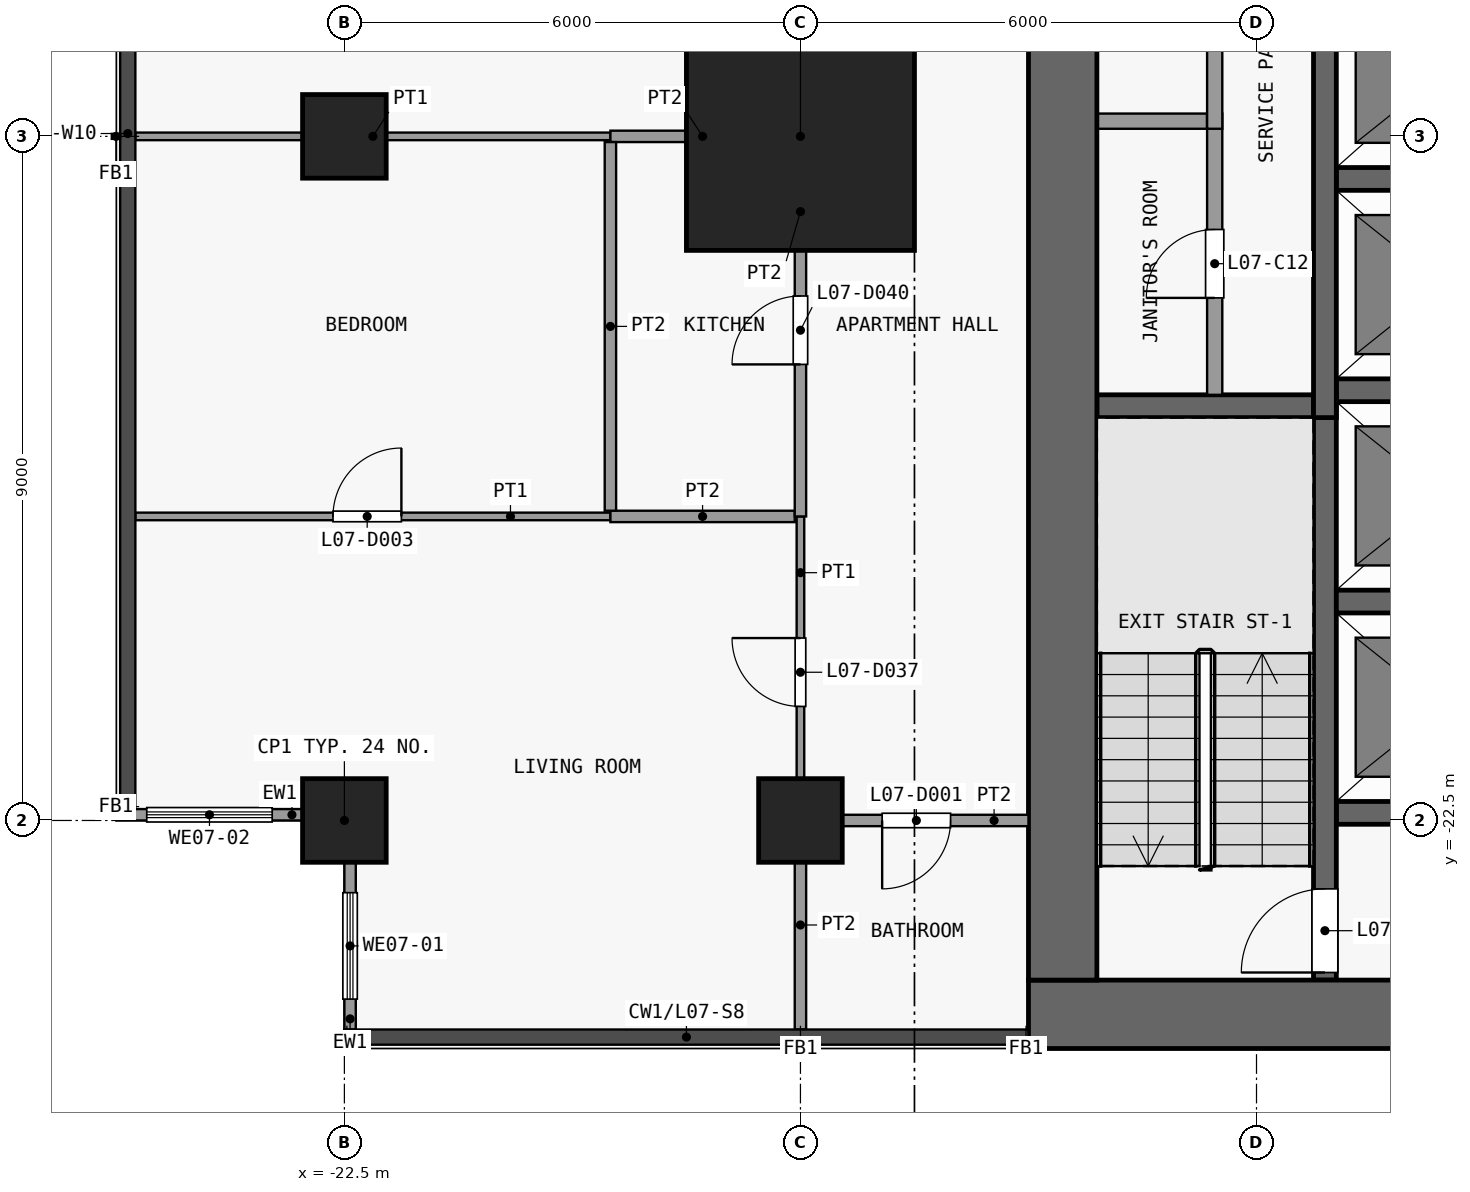
"""IFC4 building model, lengths in metres.
Left out: names, types, materials, properties, quantities, classifications, styles, units other than length and angle.
Written with IfcOpenShell. Run it as: python <this file> out.ifc"""

import sys

from ifc_helpers import new_model, si_unit, direction, frame, frame_2d, origin, origin_2d, place, context, subcontext, project, spatial, rectangle, extrude, element, fill, save


model = new_model("IFC4")
c1 = context("Model", 3, precision=1e-05, world=origin(), true_north=direction((0.0, 1.0)))
c2 = subcontext(c1, "Body", "Model", "MODEL_VIEW")
j1 = project(units=[si_unit("LENGTHUNIT", "METRE"), si_unit("PLANEANGLEUNIT", "RADIAN")], contexts=[c1])
p1 = place(None, origin())
s1 = spatial("IfcSite", under=j1, at=p1, CompositionType="ELEMENT")
p2 = place(p1, origin())
s2 = spatial("IfcBuilding", under=s1, at=p2, CompositionType="ELEMENT")
p3 = place(p2, frame((0.0, 0.0, 36.1)))
s3 = spatial("IfcBuildingStorey", under=s2, at=p3, CompositionType="ELEMENT", Elevation=36.1)
for number, where, z_axis, x_axis in (
    (1, (-22.5, -22.5, 0.0), (0.0, 0.0, 1.0), (1.0, 0.0, 0.0)),
    (2, (-22.5, -13.5, 0.0), (0.0, 0.0, 1.0), (1.0, 0.0, 0.0)),
    (3, (-16.5, -22.5, 0.0), (0.0, 0.0, 1.0), (1.0, 0.0, 0.0)),
):
    element("IfcColumn", number, at=place(p3, frame(where, z_axis=z_axis, x_axis=x_axis)), inside=s3, PredefinedType="COLUMN", context=c2, shape_type="SweptSolid", body=[
        extrude(rectangle(XDim=1.1, YDim=1.1, at=origin_2d()), origin(), (0.0, 0.0, 1.0), 3.6),
    ])
p4 = place(p3, frame((-16.5, -13.5, 0.0), z_axis=(0.0, 0.0, 1.0), x_axis=(1.0, 0.0, 0.0)))
e4 = element("IfcColumn", 4, at=p4, inside=s3, PredefinedType="COLUMN", context=c2, shape_type="SweptSolid", body=[
    extrude(rectangle(XDim=3.0, YDim=3.0, at=origin_2d()), origin(), (0.0, 0.0, 1.0), 3.6),
])
p5 = place(p3, frame((-13.5, -25.05, 0.0), z_axis=(0.0, 0.0, 1.0), x_axis=(1.0, 0.0, 0.0)))
e5 = element("IfcWall", 5, at=p5, inside=s3, PredefinedType="SHEAR", context=c2, shape_type="SweptSolid", body=[
    extrude(rectangle(XDim=27.0, YDim=0.9, at=frame_2d((13.5, 0.0))), origin(), (0.0, 0.0, 1.0), 3.3),
])
p6 = place(p3, frame((-13.05, -24.6, 0.0), z_axis=(0.0, 0.0, 1.0), x_axis=(0.0, 1.0, 0.0)))
e6 = element("IfcWall", 6, at=p6, inside=s3, PredefinedType="SHEAR", context=c2, shape_type="SweptSolid", body=[
    extrude(rectangle(XDim=16.1, YDim=0.9, at=frame_2d((8.05, 0.0))), origin(), (0.0, 0.0, 1.0), 3.3),
])
for number, where, z_axis, x_axis in (
    (7, (-9.45, -22.4, 0.0), (0.0, 0.0, 1.0), (1.0, 0.0, 0.0)),
    (8, (-9.45, -19.62, 0.0), (0.0, 0.0, 1.0), (1.0, 0.0, 0.0)),
):
    element("IfcWall", number, at=place(p3, frame(where, z_axis=z_axis, x_axis=x_axis)), inside=s3, PredefinedType="SHEAR", context=c2, shape_type="SweptSolid", body=[
        extrude(rectangle(XDim=2.8, YDim=0.3, at=frame_2d((1.4, 0.0))), origin(), (0.0, 0.0, 1.0), 3.3),
    ])
p7 = place(p3, frame((-12.6, -17.05, 0.0), z_axis=(0.0, 0.0, 1.0), x_axis=(1.0, 0.0, 0.0)))
e9 = element("IfcWall", 9, at=p7, inside=s3, PredefinedType="SHEAR", context=c2, shape_type="SweptSolid", body=[
    extrude(rectangle(XDim=2.85, YDim=0.3, at=frame_2d((1.425, 0.0))), origin(), (0.0, 0.0, 1.0), 3.3),
])
for number, where, z_axis, x_axis in (
    (10, (-9.45, -16.84, 0.0), (0.0, 0.0, 1.0), (1.0, 0.0, 0.0)),
    (11, (-9.45, -14.06, 0.0), (0.0, 0.0, 1.0), (1.0, 0.0, 0.0)),
):
    element("IfcWall", number, at=place(p3, frame(where, z_axis=z_axis, x_axis=x_axis)), inside=s3, PredefinedType="SHEAR", context=c2, shape_type="SweptSolid", body=[
        extrude(rectangle(XDim=2.8, YDim=0.3, at=frame_2d((1.4, 0.0))), origin(), (0.0, 0.0, 1.0), 3.3),
    ])
p8 = place(p3, frame((-12.6, -13.3, 0.0), z_axis=(0.0, 0.0, 1.0), x_axis=(1.0, 0.0, 0.0)))
e12 = element("IfcWall", 12, at=p8, inside=s3, PredefinedType="PARTITIONING", context=c2, shape_type="SweptSolid", body=[
    extrude(rectangle(XDim=1.45, YDim=0.2, at=frame_2d((0.725, 0.0))), origin(), (0.0, 0.0, 1.0), 3.3),
])
p9 = place(p3, frame((-11.05, -16.9, 0.0), z_axis=(0.0, 0.0, 1.0), x_axis=(0.0, 1.0, 0.0)))
e13 = element("IfcWall", 13, at=p9, inside=s3, PredefinedType="PARTITIONING", context=c2, shape_type="SweptSolid", body=[
    extrude(rectangle(XDim=3.7, YDim=0.2, at=frame_2d((1.85, 0.0))), origin(), (0.0, 0.0, 1.0), 3.3),
])
p10 = place(p9, frame((1.275, 0.0, 0.0)))
e14 = element("IfcOpeningElement", 14, at=p10, cuts=e13, PredefinedType="OPENING", context=c2, shape_type="SweptSolid", body=[
    extrude(rectangle(XDim=0.9, YDim=2.1, at=frame_2d((0.45, 1.05))), frame((0.0, 0.11, 0.0), z_axis=(0.0, -1.0, 0.0), x_axis=(1.0, 0.0, 0.0)), (0.0, 0.0, 1.0), 0.22),
])
p11 = place(p3, frame((-11.05, -13.4, 0.0), z_axis=(0.0, 0.0, 1.0), x_axis=(0.0, 1.0, 0.0)))
e15 = element("IfcWall", 15, at=p11, inside=s3, PredefinedType="PARTITIONING", context=c2, shape_type="SweptSolid", body=[
    extrude(rectangle(XDim=4.9, YDim=0.2, at=frame_2d((2.45, 0.0))), origin(), (0.0, 0.0, 1.0), 3.3),
])
p12 = place(p11, frame((2.05, 0.0, 0.0)))
e16 = element("IfcOpeningElement", 16, at=p12, cuts=e15, PredefinedType="OPENING", context=c2, shape_type="SweptSolid", body=[
    extrude(rectangle(XDim=0.9, YDim=2.1, at=frame_2d((0.45, 1.05))), frame((0.0, 0.11, 0.0), z_axis=(0.0, -1.0, 0.0), x_axis=(1.0, 0.0, 0.0)), (0.0, 0.0, 1.0), 0.22),
])
p13 = place(p3, frame((-9.6, -24.6, 0.0), z_axis=(0.0, 0.0, 1.0), x_axis=(0.0, 1.0, 0.0)))
e17 = element("IfcWall", 17, at=p13, inside=s3, PredefinedType="SHEAR", context=c2, shape_type="SweptSolid", body=[
    extrude(rectangle(XDim=7.7, YDim=0.3, at=frame_2d((3.85, 0.0))), origin(), (0.0, 0.0, 1.0), 3.3),
])
p14 = place(p13, frame((0.1, 0.0, 0.0)))
e18 = element("IfcOpeningElement", 18, at=p14, cuts=e17, PredefinedType="OPENING", context=c2, shape_type="SweptSolid", body=[
    extrude(rectangle(XDim=1.1, YDim=2.1, at=frame_2d((0.55, 1.05))), frame((0.0, 0.16, 0.0), z_axis=(0.0, -1.0, 0.0), x_axis=(1.0, 0.0, 0.0)), (0.0, 0.0, 1.0), 0.32),
])
p15 = place(p3, frame((-9.6, -17.2, 0.0), z_axis=(0.0, 0.0, 1.0), x_axis=(0.0, 1.0, 0.0)))
e19 = element("IfcWall", 19, at=p15, inside=s3, PredefinedType="SHEAR", context=c2, shape_type="SweptSolid", body=[
    extrude(rectangle(XDim=8.7, YDim=0.3, at=frame_2d((4.35, 0.0))), origin(), (0.0, 0.0, 1.0), 3.3),
])
p16 = place(p3, frame((-22.425, -25.25, 0.0), z_axis=(0.0, 0.0, 1.0), x_axis=(0.0, 1.0, 0.0)))
e20 = element("IfcWall", 20, at=p16, inside=s3, PredefinedType="SOLIDWALL", context=c2, shape_type="SweptSolid", body=[
    extrude(rectangle(XDim=2.2, YDim=0.15, at=frame_2d((1.1, 0.0))), origin(), (0.0, 0.0, 1.0), 3.3),
])
p17 = place(p16, frame((0.4, 0.0, 0.9)))
e21 = element("IfcOpeningElement", 21, at=p17, cuts=e20, PredefinedType="OPENING", context=c2, shape_type="SweptSolid", body=[
    extrude(rectangle(XDim=1.4, YDim=2.4, at=frame_2d((0.7, 1.2))), frame((0.0, 0.085, 0.0), z_axis=(0.0, -1.0, 0.0), x_axis=(1.0, 0.0, 0.0)), (0.0, 0.0, 1.0), 0.17),
])
p18 = place(p3, frame((-23.05, -22.425, 0.0), z_axis=(0.0, 0.0, 1.0), x_axis=(-1.0, 0.0, 0.0)))
e22 = element("IfcWall", 22, at=p18, inside=s3, PredefinedType="SOLIDWALL", context=c2, shape_type="SweptSolid", body=[
    extrude(rectangle(XDim=2.45, YDim=0.15, at=frame_2d((1.225, 0.0))), origin(), (0.0, 0.0, 1.0), 3.3),
])
p19 = place(p18, frame((0.4, 0.0, 0.9)))
e23 = element("IfcOpeningElement", 23, at=p19, cuts=e22, PredefinedType="OPENING", context=c2, shape_type="SweptSolid", body=[
    extrude(rectangle(XDim=1.65, YDim=2.4, at=frame_2d((0.825, 1.2))), frame((0.0, 0.085, 0.0), z_axis=(0.0, -1.0, 0.0), x_axis=(1.0, 0.0, 0.0)), (0.0, 0.0, 1.0), 0.17),
])
p20 = place(p3, frame((-16.425, -22.5, 0.0), z_axis=(0.0, 0.0, 1.0), x_axis=(1.0, 0.0, 0.0)))
e24 = element("IfcWall", 24, at=p20, inside=s3, PredefinedType="PARTITIONING", context=c2, shape_type="SweptSolid", body=[
    extrude(rectangle(XDim=2.925, YDim=0.15, at=frame_2d((1.462, 0.0))), origin(), (0.0, 0.0, 1.0), 3.3),
])
p21 = place(p20, frame((1.0, 0.0, 0.0)))
e25 = element("IfcOpeningElement", 25, at=p21, cuts=e24, PredefinedType="OPENING", context=c2, shape_type="SweptSolid", body=[
    extrude(rectangle(XDim=0.9, YDim=2.1, at=frame_2d((0.45, 1.05))), frame((0.0, 0.085, 0.0), z_axis=(0.0, -1.0, 0.0), x_axis=(1.0, 0.0, 0.0)), (0.0, 0.0, 1.0), 0.17),
])
p22 = place(p3, frame((-25.25, -18.5, 0.0), z_axis=(0.0, 0.0, 1.0), x_axis=(1.0, 0.0, 0.0)))
e26 = element("IfcWall", 26, at=p22, inside=s3, PredefinedType="PARTITIONING", context=c2, shape_type="SweptSolid", body=[
    extrude(rectangle(XDim=6.25, YDim=0.1, at=frame_2d((3.125, 0.0))), origin(), (0.0, 0.0, 1.0), 3.3),
])
p23 = place(p22, frame((2.6, 0.0, 0.0)))
e27 = element("IfcOpeningElement", 27, at=p23, cuts=e26, PredefinedType="OPENING", context=c2, shape_type="SweptSolid", body=[
    extrude(rectangle(XDim=0.9, YDim=2.1, at=frame_2d((0.45, 1.05))), frame((0.0, 0.06, 0.0), z_axis=(0.0, -1.0, 0.0), x_axis=(1.0, 0.0, 0.0)), (0.0, 0.0, 1.0), 0.12),
])
p24 = place(p3, frame((-19.0, -18.5, 0.0), z_axis=(0.0, 0.0, 1.0), x_axis=(1.0, 0.0, 0.0)))
e28 = element("IfcWall", 28, at=p24, inside=s3, PredefinedType="PARTITIONING", context=c2, shape_type="SweptSolid", body=[
    extrude(rectangle(XDim=2.425, YDim=0.15, at=frame_2d((1.212, 0.0))), origin(), (0.0, 0.0, 1.0), 3.3),
])
p25 = place(p3, frame((-25.25, -13.5, 0.0), z_axis=(0.0, 0.0, 1.0), x_axis=(1.0, 0.0, 0.0)))
e29 = element("IfcWall", 29, at=p25, inside=s3, PredefinedType="PARTITIONING", context=c2, shape_type="SweptSolid", body=[
    extrude(rectangle(XDim=6.25, YDim=0.1, at=frame_2d((3.125, 0.0))), origin(), (0.0, 0.0, 1.0), 3.3),
])
p26 = place(p3, frame((-19.0, -13.5, 0.0), z_axis=(0.0, 0.0, 1.0), x_axis=(1.0, 0.0, 0.0)))
e30 = element("IfcWall", 30, at=p26, inside=s3, PredefinedType="PARTITIONING", context=c2, shape_type="SweptSolid", body=[
    extrude(rectangle(XDim=2.425, YDim=0.15, at=frame_2d((1.212, 0.0))), origin(), (0.0, 0.0, 1.0), 3.3),
])
p27 = place(p3, frame((-19.0, -18.425, 0.0), z_axis=(0.0, 0.0, 1.0), x_axis=(0.0, 1.0, 0.0)))
e31 = element("IfcWall", 31, at=p27, inside=s3, PredefinedType="PARTITIONING", context=c2, shape_type="SweptSolid", body=[
    extrude(rectangle(XDim=4.85, YDim=0.15, at=frame_2d((2.425, 0.0))), origin(), (0.0, 0.0, 1.0), 3.3),
])
p28 = place(p3, frame((-16.5, -22.5, 0.0), z_axis=(0.0, 0.0, 1.0), x_axis=(0.0, 1.0, 0.0)))
e32 = element("IfcWall", 32, at=p28, inside=s3, PredefinedType="PARTITIONING", context=c2, shape_type="SweptSolid", body=[
    extrude(rectangle(XDim=4.0, YDim=0.1, at=frame_2d((2.0, 0.0))), origin(), (0.0, 0.0, 1.0), 3.3),
])
p29 = place(p28, frame((1.5, 0.0, 0.0)))
e33 = element("IfcOpeningElement", 33, at=p29, cuts=e32, PredefinedType="OPENING", context=c2, shape_type="SweptSolid", body=[
    extrude(rectangle(XDim=0.9, YDim=2.1, at=frame_2d((0.45, 1.05))), frame((0.0, 0.06, 0.0), z_axis=(0.0, -1.0, 0.0), x_axis=(1.0, 0.0, 0.0)), (0.0, 0.0, 1.0), 0.12),
])
p30 = place(p3, frame((-16.5, -13.5, 0.0), z_axis=(0.0, 0.0, 1.0), x_axis=(0.0, 1.0, 0.0)))
e34 = element("IfcWall", 34, at=p30, inside=s3, PredefinedType="PARTITIONING", context=c2, shape_type="SweptSolid", body=[
    extrude(rectangle(XDim=5.5, YDim=0.1, at=frame_2d((2.75, 0.0))), origin(), (0.0, 0.0, 1.0), 3.3),
])
p31 = place(p30, frame((2.3, 0.0, 0.0)))
e35 = element("IfcOpeningElement", 35, at=p31, cuts=e34, PredefinedType="OPENING", context=c2, shape_type="SweptSolid", body=[
    extrude(rectangle(XDim=0.9, YDim=2.1, at=frame_2d((0.45, 1.05))), frame((0.0, 0.06, 0.0), z_axis=(0.0, -1.0, 0.0), x_axis=(1.0, 0.0, 0.0)), (0.0, 0.0, 1.0), 0.12),
])
p32 = place(p3, frame((-16.5, -25.25, 0.0), z_axis=(0.0, 0.0, 1.0), x_axis=(0.0, 1.0, 0.0)))
e36 = element("IfcWall", 36, at=p32, inside=s3, PredefinedType="PARTITIONING", context=c2, shape_type="SweptSolid", body=[
    extrude(rectangle(XDim=2.75, YDim=0.15, at=frame_2d((1.375, 0.0))), origin(), (0.0, 0.0, 1.0), 3.3),
])
p33 = place(p3, frame((-16.5, -18.5, 0.0), z_axis=(0.0, 0.0, 1.0), x_axis=(0.0, 1.0, 0.0)))
e37 = element("IfcWall", 37, at=p33, inside=s3, PredefinedType="PARTITIONING", context=c2, shape_type="SweptSolid", body=[
    extrude(rectangle(XDim=5.0, YDim=0.15, at=frame_2d((2.5, 0.0))), origin(), (0.0, 0.0, 1.0), 3.3),
])
p34 = place(p33, frame((2.0, 0.0, 0.0)))
e38 = element("IfcOpeningElement", 38, at=p34, cuts=e37, PredefinedType="OPENING", context=c2, shape_type="SweptSolid", body=[
    extrude(rectangle(XDim=0.9, YDim=2.1, at=frame_2d((0.45, 1.05))), frame((0.0, 0.085, 0.0), z_axis=(0.0, -1.0, 0.0), x_axis=(1.0, 0.0, 0.0)), (0.0, 0.0, 1.0), 0.17),
])
p35 = place(p10, origin())
e39 = element("IfcDoor", 39, at=p35, inside=s3, OperationType="SINGLE_SWING_LEFT", PredefinedType="DOOR", context=c2, shape_type="SweptSolid", body=[
    extrude(rectangle(XDim=0.9, YDim=2.1, at=frame_2d((0.45, 1.05))), frame((0.0, 0.025, 0.0), z_axis=(0.0, -1.0, 0.0), x_axis=(1.0, 0.0, 0.0)), (0.0, 0.0, 1.0), 0.05),
])
fill(e14, e39)
p36 = place(p14, origin())
e40 = element("IfcDoor", 40, at=p36, inside=s3, OperationType="SINGLE_SWING_LEFT", PredefinedType="DOOR", context=c2, shape_type="SweptSolid", body=[
    extrude(rectangle(XDim=1.1, YDim=2.1, at=frame_2d((0.55, 1.05))), frame((0.0, 0.025, 0.0), z_axis=(0.0, -1.0, 0.0), x_axis=(1.0, 0.0, 0.0)), (0.0, 0.0, 1.0), 0.05),
])
fill(e18, e40)
p37 = place(p17, origin())
e41 = element("IfcWindow", 41, at=p37, inside=s3, PartitioningType="SINGLE_PANEL", PredefinedType="WINDOW", context=c2, shape_type="SweptSolid", body=[
    extrude(rectangle(XDim=1.4, YDim=2.4, at=frame_2d((0.7, 1.2))), frame((0.0, 0.03, 0.0), z_axis=(0.0, -1.0, 0.0), x_axis=(1.0, 0.0, 0.0)), (0.0, 0.0, 1.0), 0.06),
])
fill(e21, e41)
p38 = place(p19, origin())
e42 = element("IfcWindow", 42, at=p38, inside=s3, PartitioningType="SINGLE_PANEL", PredefinedType="WINDOW", context=c2, shape_type="SweptSolid", body=[
    extrude(rectangle(XDim=1.65, YDim=2.4, at=frame_2d((0.825, 1.2))), frame((0.0, 0.03, 0.0), z_axis=(0.0, -1.0, 0.0), x_axis=(1.0, 0.0, 0.0)), (0.0, 0.0, 1.0), 0.06),
])
fill(e23, e42)
p39 = place(p21, origin())
e43 = element("IfcDoor", 43, at=p39, inside=s3, OperationType="SINGLE_SWING_LEFT", PredefinedType="DOOR", context=c2, shape_type="SweptSolid", body=[
    extrude(rectangle(XDim=0.9, YDim=2.1, at=frame_2d((0.45, 1.05))), frame((0.0, 0.025, 0.0), z_axis=(0.0, -1.0, 0.0), x_axis=(1.0, 0.0, 0.0)), (0.0, 0.0, 1.0), 0.05),
])
fill(e25, e43)
p40 = place(p23, origin())
e44 = element("IfcDoor", 44, at=p40, inside=s3, OperationType="SINGLE_SWING_LEFT", PredefinedType="DOOR", context=c2, shape_type="SweptSolid", body=[
    extrude(rectangle(XDim=0.9, YDim=2.1, at=frame_2d((0.45, 1.05))), frame((0.0, 0.025, 0.0), z_axis=(0.0, -1.0, 0.0), x_axis=(1.0, 0.0, 0.0)), (0.0, 0.0, 1.0), 0.05),
])
fill(e27, e44)
p41 = place(p29, origin())
e45 = element("IfcDoor", 45, at=p41, inside=s3, OperationType="SINGLE_SWING_LEFT", PredefinedType="DOOR", context=c2, shape_type="SweptSolid", body=[
    extrude(rectangle(XDim=0.9, YDim=2.1, at=frame_2d((0.45, 1.05))), frame((0.0, 0.025, 0.0), z_axis=(0.0, -1.0, 0.0), x_axis=(1.0, 0.0, 0.0)), (0.0, 0.0, 1.0), 0.05),
])
fill(e33, e45)
p42 = place(p34, origin())
e46 = element("IfcDoor", 46, at=p42, inside=s3, OperationType="SINGLE_SWING_RIGHT", PredefinedType="DOOR", context=c2, shape_type="SweptSolid", body=[
    extrude(rectangle(XDim=0.9, YDim=2.1, at=frame_2d((0.45, 1.05))), frame((0.0, 0.025, 0.0), z_axis=(0.0, -1.0, 0.0), x_axis=(1.0, 0.0, 0.0)), (0.0, 0.0, 1.0), 0.05),
])
fill(e38, e46)
save(model, sys.argv[1])
